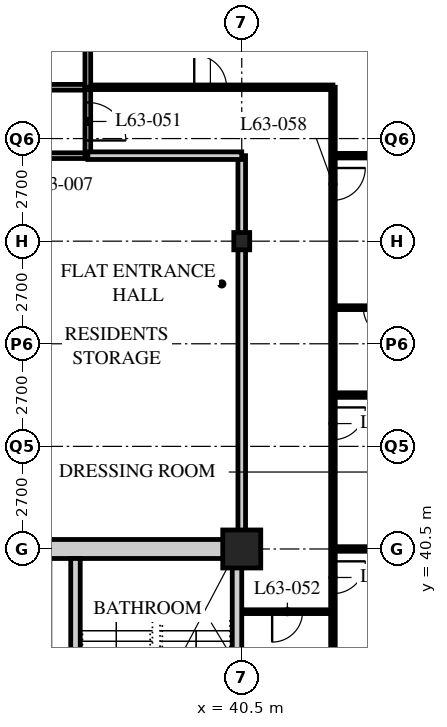
"""IFC4 building model, lengths in metres.
Left out: names, types, materials, properties, quantities, classifications, styles, units other than length and angle.
Written with IfcOpenShell. Run it as: python <this file> out.ifc"""

import sys

from ifc_helpers import new_model, si_unit, direction, frame, frame_2d, origin, origin_2d, place, context, subcontext, project, spatial, rectangle, hollow_rectangle, i_section, extrude, element, fill, save


model = new_model("IFC4")
c1 = context("Model", 3, precision=1e-05, world=origin(), true_north=direction((0.0, 1.0)))
c2 = subcontext(c1, "Body", "Model", "MODEL_VIEW")
j1 = project(units=[si_unit("LENGTHUNIT", "METRE"), si_unit("PLANEANGLEUNIT", "RADIAN")], contexts=[c1])
p1 = place(None, origin())
s1 = spatial("IfcSite", under=j1, at=p1, CompositionType="ELEMENT")
p2 = place(p1, origin())
s2 = spatial("IfcBuilding", under=s1, at=p2, CompositionType="ELEMENT")
p3 = place(p2, frame((0.0, 0.0, 246.3)))
s3 = spatial("IfcBuildingStorey", under=s2, at=p3, CompositionType="ELEMENT", Elevation=246.3)
p4 = place(p3, frame((40.5, 40.5, 0.0), z_axis=(0.0, 0.0, 1.0), x_axis=(1.0, 0.0, 0.0)))
e1 = element("IfcColumn", 1, at=p4, inside=s3, PredefinedType="COLUMN", context=c2, shape_type="SweptSolid", body=[
    extrude(hollow_rectangle(XDim=1.0, YDim=1.0, WallThickness=0.1, at=origin_2d()), origin(), (0.0, 0.0, 1.0), 3.9),
])
p5 = place(p3, frame((40.5, 48.6, 0.0), z_axis=(0.0, 0.0, 1.0), x_axis=(1.0, 0.0, 0.0)))
e2 = element("IfcColumn", 2, at=p5, inside=s3, PredefinedType="COLUMN", context=c2, shape_type="SweptSolid", body=[
    extrude(i_section(OverallWidth=0.418, OverallDepth=0.456, WebThickness=0.042, FlangeThickness=0.067, FilletRadius=0.015, at=origin_2d()), origin(), (0.0, 0.0, 1.0), 3.9),
])
p6 = place(p3, frame((12.15, 52.65, 0.0), z_axis=(0.0, 0.0, 1.0), x_axis=(1.0, 0.0, 0.0)))
e3 = element("IfcWall", 3, at=p6, inside=s3, PredefinedType="PARTITIONING", context=c2, shape_type="SweptSolid", body=[
    extrude(rectangle(XDim=24.3, YDim=0.15, at=frame_2d((12.15, 0.0))), origin(), (0.0, 0.0, 1.0), 3.69),
])
p7 = place(p6, frame((4.45, 0.0, 0.0)))
e4 = element("IfcOpeningElement", 4, at=p7, cuts=e3, PredefinedType="OPENING", context=c2, shape_type="SweptSolid", body=[
    extrude(rectangle(XDim=1.0, YDim=2.1, at=frame_2d((0.5, 1.05))), frame((0.0, 0.085, 0.0), z_axis=(0.0, -1.0, 0.0), x_axis=(1.0, 0.0, 0.0)), (0.0, 0.0, 1.0), 0.17),
])
p8 = place(p6, frame((1.525, 0.0, 0.0)))
e5 = element("IfcOpeningElement", 5, at=p8, cuts=e3, PredefinedType="OPENING", context=c2, shape_type="SweptSolid", body=[
    extrude(rectangle(XDim=1.0, YDim=2.1, at=frame_2d((0.5, 1.05))), frame((0.0, 0.085, 0.0), z_axis=(0.0, -1.0, 0.0), x_axis=(1.0, 0.0, 0.0)), (0.0, 0.0, 1.0), 0.17),
])
p9 = place(p3, frame((29.56, 50.85, 0.0), z_axis=(0.0, 0.0, 1.0), x_axis=(1.0, 0.0, 0.0)))
e6 = element("IfcWall", 6, at=p9, inside=s3, PredefinedType="PARTITIONING", context=c2, shape_type="SweptSolid", body=[
    extrude(rectangle(XDim=6.89, YDim=0.15, at=frame_2d((3.445, 0.0))), origin(), (0.0, 0.0, 1.0), 3.69),
])
p10 = place(p9, frame((0.657, 0.0, 0.0)))
e7 = element("IfcOpeningElement", 7, at=p10, cuts=e6, PredefinedType="OPENING", context=c2, shape_type="SweptSolid", body=[
    extrude(rectangle(XDim=1.0, YDim=2.1, at=frame_2d((0.5, 1.05))), frame((0.0, 0.085, 0.0), z_axis=(0.0, -1.0, 0.0), x_axis=(1.0, 0.0, 0.0)), (0.0, 0.0, 1.0), 0.17),
])
p11 = place(p9, frame((2.84, 0.0, 0.0)))
e8 = element("IfcOpeningElement", 8, at=p11, cuts=e6, PredefinedType="OPENING", context=c2, shape_type="SweptSolid", body=[
    extrude(rectangle(XDim=1.0, YDim=2.1, at=frame_2d((0.5, 1.05))), frame((0.0, 0.085, 0.0), z_axis=(0.0, -1.0, 0.0), x_axis=(1.0, 0.0, 0.0)), (0.0, 0.0, 1.0), 0.17),
])
p12 = place(p9, frame((4.873, 0.0, 0.0)))
e9 = element("IfcOpeningElement", 9, at=p12, cuts=e6, PredefinedType="OPENING", context=c2, shape_type="SweptSolid", body=[
    extrude(rectangle(XDim=1.0, YDim=2.1, at=frame_2d((0.5, 1.05))), frame((0.0, 0.085, 0.0), z_axis=(0.0, -1.0, 0.0), x_axis=(1.0, 0.0, 0.0)), (0.0, 0.0, 1.0), 0.17),
])
p13 = place(p3, frame((36.45, 50.85, 0.0), z_axis=(0.0, 0.0, 1.0), x_axis=(0.0, 1.0, 0.0)))
e10 = element("IfcWall", 10, at=p13, inside=s3, PredefinedType="PARTITIONING", context=c2, shape_type="SweptSolid", body=[
    extrude(rectangle(XDim=1.8, YDim=0.15, at=frame_2d((0.9, 0.0))), origin(), (0.0, 0.0, 1.0), 3.69),
])
p14 = place(p13, frame((0.4, 0.0, 0.0)))
e11 = element("IfcOpeningElement", 11, at=p14, cuts=e10, PredefinedType="OPENING", context=c2, shape_type="SweptSolid", body=[
    extrude(rectangle(XDim=1.0, YDim=2.1, at=frame_2d((0.5, 1.05))), frame((0.0, 0.085, 0.0), z_axis=(0.0, -1.0, 0.0), x_axis=(1.0, 0.0, 0.0)), (0.0, 0.0, 1.0), 0.17),
])
p15 = place(p3, frame((40.5, 40.5, 0.0), z_axis=(0.0, 0.0, 1.0), x_axis=(0.0, 1.0, 0.0)))
e12 = element("IfcWall", 12, at=p15, inside=s3, PredefinedType="SOLIDWALL", context=c2, shape_type="SweptSolid", body=[
    extrude(rectangle(XDim=10.35, YDim=0.2, at=frame_2d((5.175, 0.0))), origin(), (0.0, 0.0, 1.0), 3.078),
])
p16 = place(p3, frame((40.5, 38.85, 0.0), z_axis=(0.0, 0.0, 1.0), x_axis=(1.0, 0.0, 0.0)))
e13 = element("IfcWall", 13, at=p16, inside=s3, PredefinedType="PARTITIONING", context=c2, shape_type="SweptSolid", body=[
    extrude(rectangle(XDim=2.4, YDim=0.1, at=frame_2d((1.2, 0.0))), origin(), (0.0, 0.0, 1.0), 3.69),
])
p17 = place(p16, frame((0.8, 0.0, 0.0)))
e14 = element("IfcOpeningElement", 14, at=p17, cuts=e13, PredefinedType="OPENING", context=c2, shape_type="SweptSolid", body=[
    extrude(rectangle(XDim=0.8, YDim=2.1, at=frame_2d((0.4, 1.05))), frame((0.0, 0.06, 0.0), z_axis=(0.0, -1.0, 0.0), x_axis=(1.0, 0.0, 0.0)), (0.0, 0.0, 1.0), 0.12),
])
p18 = place(p3, frame((42.9, 52.65, 0.0), z_axis=(0.0, 0.0, 1.0), x_axis=(0.0, -1.0, 0.0)))
e15 = element("IfcWall", 15, at=p18, inside=s3, PredefinedType="PARTITIONING", context=c2, shape_type="SweptSolid", body=[
    extrude(rectangle(XDim=16.2, YDim=0.12, at=frame_2d((8.1, 0.0))), origin(), (0.0, 0.0, 1.0), 3.69),
])
p19 = place(p18, frame((2.125, 0.0, 0.0)))
e16 = element("IfcOpeningElement", 16, at=p19, cuts=e15, PredefinedType="OPENING", context=c2, shape_type="SweptSolid", body=[
    extrude(rectangle(XDim=0.85, YDim=2.1, at=frame_2d((0.425, 1.05))), frame((0.0, 0.07, 0.0), z_axis=(0.0, -1.0, 0.0), x_axis=(1.0, 0.0, 0.0)), (0.0, 0.0, 1.0), 0.14),
])
p20 = place(p18, frame((8.425, 0.0, 0.0)))
e17 = element("IfcOpeningElement", 17, at=p20, cuts=e15, PredefinedType="OPENING", context=c2, shape_type="SweptSolid", body=[
    extrude(rectangle(XDim=0.85, YDim=2.1, at=frame_2d((0.425, 1.05))), frame((0.0, 0.07, 0.0), z_axis=(0.0, -1.0, 0.0), x_axis=(1.0, 0.0, 0.0)), (0.0, 0.0, 1.0), 0.14),
])
p21 = place(p18, frame((12.475, 0.0, 0.0)))
e18 = element("IfcOpeningElement", 18, at=p21, cuts=e15, PredefinedType="OPENING", context=c2, shape_type="SweptSolid", body=[
    extrude(rectangle(XDim=0.85, YDim=2.1, at=frame_2d((0.425, 1.05))), frame((0.0, 0.07, 0.0), z_axis=(0.0, -1.0, 0.0), x_axis=(1.0, 0.0, 0.0)), (0.0, 0.0, 1.0), 0.14),
])
p22 = place(p3, frame((36.45, 52.65, 0.0), z_axis=(0.0, 0.0, 1.0), x_axis=(1.0, 0.0, 0.0)))
e19 = element("IfcWall", 19, at=p22, inside=s3, PredefinedType="PARTITIONING", context=c2, shape_type="SweptSolid", body=[
    extrude(rectangle(XDim=6.45, YDim=0.12, at=frame_2d((3.225, 0.0))), origin(), (0.0, 0.0, 1.0), 3.69),
])
p23 = place(p22, frame((2.8, 0.0, 0.0)))
e20 = element("IfcOpeningElement", 20, at=p23, cuts=e19, PredefinedType="OPENING", context=c2, shape_type="SweptSolid", body=[
    extrude(rectangle(XDim=0.85, YDim=2.1, at=frame_2d((0.425, 1.05))), frame((0.0, 0.07, 0.0), z_axis=(0.0, -1.0, 0.0), x_axis=(1.0, 0.0, 0.0)), (0.0, 0.0, 1.0), 0.14),
])
p24 = place(p3, frame((36.45, 50.85, 0.0), z_axis=(0.0, 0.0, 1.0), x_axis=(1.0, 0.0, 0.0)))
e21 = element("IfcWall", 21, at=p24, inside=s3, PredefinedType="SOLIDWALL", context=c2, shape_type="SweptSolid", body=[
    extrude(rectangle(XDim=4.05, YDim=0.2, at=frame_2d((2.025, 0.0))), origin(), (0.0, 0.0, 1.0), 3.69),
])
p25 = place(p3, frame((42.9, 50.85, 0.0), z_axis=(0.0, 0.0, 1.0), x_axis=(1.0, 0.0, 0.0)))
e22 = element("IfcWall", 22, at=p25, inside=s3, PredefinedType="PARTITIONING", context=c2, shape_type="SweptSolid", body=[
    extrude(rectangle(XDim=13.5, YDim=0.12, at=frame_2d((6.75, 0.0))), origin(), (0.0, 0.0, 1.0), 3.69),
])
p26 = place(p3, frame((36.45, 64.5, 0.0), z_axis=(0.0, 0.0, 1.0), x_axis=(0.0, -1.0, 0.0)))
e23 = element("IfcWall", 23, at=p26, inside=s3, PredefinedType="PARTITIONING", context=c2, shape_type="SweptSolid", body=[
    extrude(rectangle(XDim=11.85, YDim=0.15, at=frame_2d((5.925, 0.0))), origin(), (0.0, 0.0, 1.0), 3.69),
])
p27 = place(p3, frame((42.9, 46.85, 0.0), z_axis=(0.0, 0.0, 1.0), x_axis=(1.0, 0.0, 0.0)))
e24 = element("IfcWall", 24, at=p27, inside=s3, PredefinedType="PARTITIONING", context=c2, shape_type="SweptSolid", body=[
    extrude(rectangle(XDim=2.4, YDim=0.1, at=frame_2d((1.2, 0.0))), origin(), (0.0, 0.0, 1.0), 3.69),
])
p28 = place(p27, frame((0.8, 0.0, 0.0)))
e25 = element("IfcOpeningElement", 25, at=p28, cuts=e24, PredefinedType="OPENING", context=c2, shape_type="SweptSolid", body=[
    extrude(rectangle(XDim=0.8, YDim=2.1, at=frame_2d((0.4, 1.05))), frame((0.0, 0.06, 0.0), z_axis=(0.0, -1.0, 0.0), x_axis=(1.0, 0.0, 0.0)), (0.0, 0.0, 1.0), 0.12),
])
p29 = place(p3, frame((42.9, 44.55, 0.0), z_axis=(0.0, 0.0, 1.0), x_axis=(1.0, 0.0, 0.0)))
e26 = element("IfcWall", 26, at=p29, inside=s3, PredefinedType="PARTITIONING", context=c2, shape_type="SweptSolid", body=[
    extrude(rectangle(XDim=13.5, YDim=0.12, at=frame_2d((6.75, 0.0))), origin(), (0.0, 0.0, 1.0), 3.69),
])
p30 = place(p3, frame((42.9, 40.5, 0.0), z_axis=(0.0, 0.0, 1.0), x_axis=(1.0, 0.0, 0.0)))
e27 = element("IfcWall", 27, at=p30, inside=s3, PredefinedType="PARTITIONING", context=c2, shape_type="SweptSolid", body=[
    extrude(rectangle(XDim=13.5, YDim=0.12, at=frame_2d((6.75, 0.0))), origin(), (0.0, 0.0, 1.0), 3.078),
])
p31 = place(p3, frame((15.95, 40.5, 0.0), z_axis=(0.0, 0.0, 1.0), x_axis=(1.0, 0.0, 0.0)))
e28 = element("IfcWall", 28, at=p31, inside=s3, PredefinedType="SOLIDWALL", context=c2, shape_type="SweptSolid", body=[
    extrude(rectangle(XDim=24.55, YDim=0.5, at=frame_2d((12.275, 0.0))), origin(), (0.0, 0.0, 1.0), 3.04),
])
p32 = place(p31, frame((11.5, 0.0, 0.0)))
e29 = element("IfcOpeningElement", 29, at=p32, cuts=e28, PredefinedType="OPENING", context=c2, shape_type="SweptSolid", body=[
    extrude(rectangle(XDim=1.8, YDim=2.4, at=frame_2d((0.9, 1.2))), frame((0.0, 0.26, 0.0), z_axis=(0.0, -1.0, 0.0), x_axis=(1.0, 0.0, 0.0)), (0.0, 0.0, 1.0), 0.52),
])
p33 = place(p3, frame((40.375, 24.55, 0.0), z_axis=(0.0, 0.0, 1.0), x_axis=(0.0, 1.0, 0.0)))
e30 = element("IfcWall", 30, at=p33, inside=s3, PredefinedType="SOLIDWALL", context=c2, shape_type="SweptSolid", body=[
    extrude(rectangle(XDim=15.7, YDim=0.25, at=frame_2d((7.85, 0.0))), origin(), (0.0, 0.0, 1.0), 3.078),
])
p34 = place(p3, frame((36.125, 32.5, 0.0), z_axis=(0.0, 0.0, 1.0), x_axis=(0.0, 1.0, 0.0)))
e31 = element("IfcWall", 31, at=p34, inside=s3, PredefinedType="SOLIDWALL", context=c2, shape_type="SweptSolid", body=[
    extrude(rectangle(XDim=7.75, YDim=0.25, at=frame_2d((3.875, 0.0))), origin(), (0.0, 0.0, 1.0), 3.69),
])
p35 = place(p34, frame((0.45, 0.0, 0.0)))
e32 = element("IfcOpeningElement", 32, at=p35, cuts=e31, PredefinedType="OPENING", context=c2, shape_type="SweptSolid", body=[
    extrude(rectangle(XDim=1.2, YDim=2.1, at=frame_2d((0.6, 1.05))), frame((0.0, 0.135, 0.0), z_axis=(0.0, -1.0, 0.0), x_axis=(1.0, 0.0, 0.0)), (0.0, 0.0, 1.0), 0.27),
])
p36 = place(p14, origin())
e33 = element("IfcDoor", 33, at=p36, inside=s3, OperationType="SINGLE_SWING_RIGHT", PredefinedType="DOOR", context=c2, shape_type="SweptSolid", body=[
    extrude(rectangle(XDim=1.0, YDim=2.1, at=frame_2d((0.5, 1.05))), frame((0.0, 0.025, 0.0), z_axis=(0.0, -1.0, 0.0), x_axis=(1.0, 0.0, 0.0)), (0.0, 0.0, 1.0), 0.05),
])
fill(e11, e33)
p37 = place(p17, origin())
e34 = element("IfcDoor", 34, at=p37, inside=s3, OperationType="SINGLE_SWING_RIGHT", PredefinedType="DOOR", context=c2, shape_type="SweptSolid", body=[
    extrude(rectangle(XDim=0.8, YDim=2.1, at=frame_2d((0.4, 1.05))), frame((0.0, 0.025, 0.0), z_axis=(0.0, -1.0, 0.0), x_axis=(1.0, 0.0, 0.0)), (0.0, 0.0, 1.0), 0.05),
])
fill(e14, e34)
p38 = place(p23, origin())
e35 = element("IfcDoor", 35, at=p38, inside=s3, OperationType="SINGLE_SWING_LEFT", PredefinedType="DOOR", context=c2, shape_type="SweptSolid", body=[
    extrude(rectangle(XDim=0.85, YDim=2.1, at=frame_2d((0.425, 1.05))), frame((0.0, 0.025, 0.0), z_axis=(0.0, -1.0, 0.0), x_axis=(1.0, 0.0, 0.0)), (0.0, 0.0, 1.0), 0.05),
])
fill(e20, e35)
p39 = place(p28, origin())
e36 = element("IfcDoor", 36, at=p39, inside=s3, OperationType="SINGLE_SWING_LEFT", PredefinedType="DOOR", context=c2, shape_type="SweptSolid", body=[
    extrude(rectangle(XDim=0.8, YDim=2.1, at=frame_2d((0.4, 1.05))), frame((0.0, 0.025, 0.0), z_axis=(0.0, -1.0, 0.0), x_axis=(1.0, 0.0, 0.0)), (0.0, 0.0, 1.0), 0.05),
])
fill(e25, e36)
p40 = place(p19, origin())
e37 = element("IfcDoor", 37, at=p40, inside=s3, OperationType="SINGLE_SWING_LEFT", PredefinedType="DOOR", context=c2, shape_type="SweptSolid", body=[
    extrude(rectangle(XDim=0.85, YDim=2.1, at=frame_2d((0.425, 1.05))), frame((0.0, 0.025, 0.0), z_axis=(0.0, -1.0, 0.0), x_axis=(1.0, 0.0, 0.0)), (0.0, 0.0, 1.0), 0.05),
])
fill(e16, e37)
p41 = place(p20, origin())
e38 = element("IfcDoor", 38, at=p41, inside=s3, OperationType="SINGLE_SWING_LEFT", PredefinedType="DOOR", context=c2, shape_type="SweptSolid", body=[
    extrude(rectangle(XDim=0.85, YDim=2.1, at=frame_2d((0.425, 1.05))), frame((0.0, 0.025, 0.0), z_axis=(0.0, -1.0, 0.0), x_axis=(1.0, 0.0, 0.0)), (0.0, 0.0, 1.0), 0.05),
])
fill(e17, e38)
p42 = place(p21, origin())
e39 = element("IfcDoor", 39, at=p42, inside=s3, OperationType="SINGLE_SWING_LEFT", PredefinedType="DOOR", context=c2, shape_type="SweptSolid", body=[
    extrude(rectangle(XDim=0.85, YDim=2.1, at=frame_2d((0.425, 1.05))), frame((0.0, 0.025, 0.0), z_axis=(0.0, -1.0, 0.0), x_axis=(1.0, 0.0, 0.0)), (0.0, 0.0, 1.0), 0.05),
])
fill(e18, e39)
save(model, sys.argv[1])
